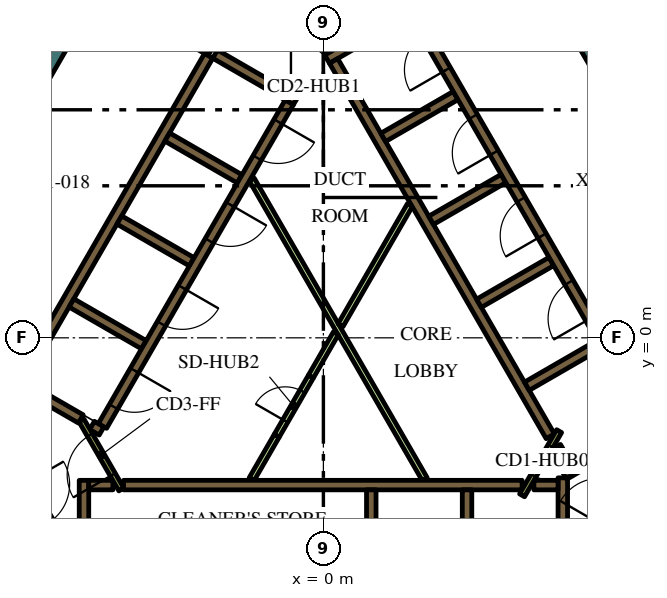
"""IFC4 building model, lengths in metres.
Left out: names, types, materials, properties, quantities, classifications, styles, units other than length and angle.
Written with IfcOpenShell. Run it as: python <this file> out.ifc"""

import sys

from ifc_helpers import new_model, si_unit, direction, frame, frame_2d, origin, place, context, subcontext, project, spatial, polyline, rectangle, outline, extrude, element, fill, save


model = new_model("IFC4")
c1 = context("Model", 3, precision=1e-05, world=origin(), true_north=direction((0.0, 1.0)))
c2 = subcontext(c1, "Body", "Model", "MODEL_VIEW")
j1 = project(units=[si_unit("LENGTHUNIT", "METRE"), si_unit("PLANEANGLEUNIT", "RADIAN")], contexts=[c1])
p1 = place(None, origin())
s1 = spatial("IfcSite", under=j1, at=p1, CompositionType="ELEMENT")
p2 = place(p1, origin())
s2 = spatial("IfcBuilding", under=s1, at=p2, CompositionType="ELEMENT")
p3 = place(p2, frame((0.0, 0.0, 271.2)))
s3 = spatial("IfcBuildingStorey", under=s2, at=p3, CompositionType="ELEMENT", Elevation=271.2)
p4 = place(p3, frame((1.989, 16.456, 0.0), z_axis=(0.0, 0.0, 1.0), x_axis=(0.49999102663, -0.8660305845, 0.0)))
e1 = element("IfcWall", 1, at=p4, inside=s3, PredefinedType="SOLIDWALL", context=c2, shape_type="SweptSolid", body=[
    extrude(rectangle(XDim=12.406, YDim=0.6, at=frame_2d((6.203, 0.0))), origin(), (0.0, 0.0, 1.0), 4.2),
])
p5 = place(p3, frame((-4.234, 12.566, 0.0), z_axis=(0.0, 0.0, 1.0), x_axis=(-0.499998841866, -0.866026072432, 0.0)))
e2 = element("IfcWall", 2, at=p5, inside=s3, PredefinedType="SOLIDWALL", context=c2, shape_type="SweptSolid", body=[
    extrude(rectangle(XDim=16.694, YDim=0.6, at=frame_2d((8.347, 0.0))), origin(), (0.0, 0.0, 1.0), 4.2),
])
p6 = place(p3, frame((6.3, -7.24, 0.0), z_axis=(0.0, 0.0, 1.0), x_axis=(0.0, 1.0, 0.0)))
e3 = element("IfcWall", 3, at=p6, inside=s3, PredefinedType="SOLIDWALL", context=c2, shape_type="SweptSolid", body=[
    extrude(rectangle(XDim=3.556, YDim=0.25, at=frame_2d((1.778, 0.0))), origin(), (0.0, 0.0, 1.0), 4.2),
])
p7 = place(p3, frame((5.538, -3.875, 0.0), z_axis=(0.0, 0.0, 1.0), x_axis=(1.0, 0.0, 0.0)))
e4 = element("IfcWall", 4, at=p7, inside=s3, PredefinedType="SOLIDWALL", context=c2, shape_type="SweptSolid", body=[
    extrude(rectangle(XDim=0.637, YDim=0.25, at=frame_2d((0.318, 0.0))), origin(), (0.0, 0.0, 1.0), 4.2),
])
p8 = place(p3, frame((-5.259, -3.875, 0.0), z_axis=(0.0, 0.0, 1.0), x_axis=(1.0, 0.0, 0.0)))
e5 = element("IfcWall", 5, at=p8, inside=s3, PredefinedType="SOLIDWALL", context=c2, shape_type="SweptSolid", body=[
    extrude(rectangle(XDim=10.489, YDim=0.25, at=frame_2d((5.244, 0.0))), origin(), (0.0, 0.0, 1.0), 4.2),
])
for number, where, z_axis, x_axis in (
    (6, (1.26, -4.0, 0.0), (0.0, 0.0, 1.0), (0.0, -1.0, 0.0)),
    (7, (3.78, -4.0, 0.0), (0.0, 0.0, 1.0), (0.0, -1.0, 0.0)),
):
    element("IfcWall", number, at=place(p3, frame(where, z_axis=z_axis, x_axis=x_axis)), inside=s3, PredefinedType="SOLIDWALL", context=c2, shape_type="SweptSolid", body=[
        extrude(rectangle(XDim=2.2, YDim=0.25, at=frame_2d((1.1, 0.0))), origin(), (0.0, 0.0, 1.0), 4.2),
    ])
p9 = place(p3, frame((-6.3, -7.125, 0.0), z_axis=(0.0, 0.0, 1.0), x_axis=(0.0, 1.0, 0.0)))
e8 = element("IfcWall", 8, at=p9, inside=s3, PredefinedType="SOLIDWALL", context=c2, shape_type="SweptSolid", body=[
    extrude(rectangle(XDim=3.375, YDim=0.25, at=frame_2d((1.687, 0.0))), origin(), (0.0, 0.0, 1.0), 4.2),
])
p10 = place(p3, frame((-6.175, -3.875, 0.0), z_axis=(0.0, 0.0, 1.0), x_axis=(1.0, 0.0, 0.0)))
e9 = element("IfcWall", 9, at=p10, inside=s3, PredefinedType="SOLIDWALL", context=c2, shape_type="SweptSolid", body=[
    extrude(rectangle(XDim=0.637, YDim=0.25, at=frame_2d((0.318, 0.0))), origin(), (0.0, 0.0, 1.0), 4.2),
])
p11 = place(p3, frame((9.19, -1.969, 0.0), z_axis=(0.0, 0.0, 1.0), x_axis=(-0.866057109641, -0.499945079824, 0.0)))
e10 = element("IfcWall", 10, at=p11, inside=s3, PredefinedType="SOLIDWALL", context=c2, shape_type="SweptSolid", body=[
    extrude(rectangle(XDim=3.291, YDim=0.25, at=frame_2d((1.646, 0.0))), origin(), (0.0, 0.0, 1.0), 4.2),
])
p12 = place(p3, frame((6.13, -2.867, 0.0), z_axis=(0.0, 0.0, 1.0), x_axis=(0.500160776593, -0.865932559475, 0.0)))
e11 = element("IfcWall", 11, at=p12, inside=s3, PredefinedType="SOLIDWALL", context=c2, shape_type="SweptSolid", body=[
    extrude(rectangle(XDim=0.627, YDim=0.25, at=frame_2d((0.313, 0.0))), origin(), (0.0, 0.0, 1.0), 4.2),
])
p13 = place(p3, frame((3.1, 9.064, 0.0), z_axis=(0.0, 0.0, 1.0), x_axis=(-0.866033137035, -0.499986605379, 0.0)))
e12 = element("IfcWall", 12, at=p13, inside=s3, PredefinedType="SOLIDWALL", context=c2, shape_type="SweptSolid", body=[
    extrude(rectangle(XDim=3.467, YDim=0.25, at=frame_2d((1.733, 0.0))), origin(), (0.0, 0.0, 1.0), 4.2),
])
p14 = place(p3, frame((0.268, 7.285, 0.0), z_axis=(0.0, 0.0, 1.0), x_axis=(0.500098681536, -0.865968422476, 0.0)))
e13 = element("IfcWall", 13, at=p14, inside=s3, PredefinedType="SOLIDWALL", context=c2, shape_type="SweptSolid", body=[
    extrude(rectangle(XDim=0.636, YDim=0.25, at=frame_2d((0.318, 0.0))), origin(), (0.0, 0.0, 1.0), 4.2),
])
p15 = place(p3, frame((5.97, -2.591, 0.0), z_axis=(0.0, 0.0, 1.0), x_axis=(-0.499994469932, 0.866028596547, 0.0)))
e14 = element("IfcWall", 14, at=p15, inside=s3, PredefinedType="SOLIDWALL", context=c2, shape_type="SweptSolid", body=[
    extrude(rectangle(XDim=10.488, YDim=0.25, at=frame_2d((5.244, 0.0))), origin(), (0.0, 0.0, 1.0), 4.2),
])
p16 = place(p3, frame((1.574, 5.274, 0.0), z_axis=(0.0, 0.0, 1.0), x_axis=(0.866028486751, 0.499994660107, 0.0)))
e15 = element("IfcWall", 15, at=p16, inside=s3, PredefinedType="SOLIDWALL", context=c2, shape_type="SweptSolid", body=[
    extrude(rectangle(XDim=2.2, YDim=0.25, at=frame_2d((1.1, 0.0))), origin(), (0.0, 0.0, 1.0), 4.2),
])
for number, where, z_axis, x_axis in (
    (16, (2.834, 3.091, 0.0), (0.0, 0.0, 1.0), (0.866, 0.5, 0.0)),
    (17, (4.094, 0.909, 0.0), (0.0, 0.0, 1.0), (0.866, 0.5, 0.0)),
    (18, (5.354, -1.274, 0.0), (0.0, 0.0, 1.0), (0.866, 0.5, 0.0)),
):
    element("IfcWall", number, at=place(p3, frame(where, z_axis=z_axis, x_axis=x_axis)), inside=s3, PredefinedType="SOLIDWALL", context=c2, shape_type="SweptSolid", body=[
        extrude(rectangle(XDim=2.2, YDim=0.25, at=frame_2d((1.1, 0.0))), origin(), (0.0, 0.0, 1.0), 4.2),
    ])
p17 = place(p3, frame((-3.02, 7.419, 0.0), z_axis=(0.0, 0.0, 1.0), x_axis=(-0.500022956343, -0.866012149528, 0.0)))
e19 = element("IfcWall", 19, at=p17, inside=s3, PredefinedType="SOLIDWALL", context=c2, shape_type="SweptSolid", body=[
    extrude(rectangle(XDim=10.08, YDim=0.25, at=frame_2d((5.04, 0.0))), origin(), (0.0, 0.0, 1.0), 4.2),
])
p18 = place(p3, origin())
e20 = element("IfcWall", 20, at=p18, inside=s3, PredefinedType="SOLIDWALL", context=c2, shape_type="SweptSolid", body=[
    extrude(outline(polyline([(-2.912, 7.356), (-2.787, 7.573), (-1.232, 6.675), (-1.303, 6.675), (-1.304, 6.675), (-1.304, 6.675), (-1.304, 6.525), (-1.304, 6.525), (-1.303, 6.525), (-0.971, 6.525), (-0.665, 6.348), (-0.79, 6.132), (-1.007, 6.257), (-1.007, 6.257), (-2.912, 7.356)])), origin(), (0.0, 0.0, 1.0), 4.2),
])
for number, where, z_axis, x_axis in (
    (21, (-2.204, 4.182, 0.0), (0.0, 0.0, 1.0), (-0.866, 0.5, 0.0)),
    (22, (-5.369, 3.1, 0.0), (0.0, 0.0, 1.0), (0.866, -0.5, 0.0)),
    (23, (-4.724, -0.182, 0.0), (0.0, 0.0, 1.0), (-0.866, 0.5, 0.0)),
):
    element("IfcWall", number, at=place(p3, frame(where, z_axis=z_axis, x_axis=x_axis)), inside=s3, PredefinedType="SOLIDWALL", context=c2, shape_type="SweptSolid", body=[
        extrude(rectangle(XDim=2.2, YDim=0.25, at=frame_2d((1.1, 0.0))), origin(), (0.0, 0.0, 1.0), 4.2),
    ])
p19 = place(p3, frame((-6.088, -2.305, 0.0), z_axis=(0.0, 0.0, 1.0), x_axis=(0.866059450854, -0.499941024108, 0.0)))
e24 = element("IfcWall", 24, at=p19, inside=s3, PredefinedType="SOLIDWALL", context=c2, shape_type="SweptSolid", body=[
    extrude(rectangle(XDim=0.29, YDim=0.25, at=frame_2d((0.145, 0.0))), origin(), (0.0, 0.0, 1.0), 4.2),
])
p20 = place(p3, frame((-7.889, -1.265, 0.0), z_axis=(0.0, 0.0, 1.0), x_axis=(0.865986741702, -0.500066958712, 0.0)))
e25 = element("IfcWall", 25, at=p20, inside=s3, PredefinedType="SOLIDWALL", context=c2, shape_type="SweptSolid", body=[
    extrude(rectangle(XDim=1.738, YDim=0.25, at=frame_2d((0.869, 0.0))), origin(), (0.0, 0.0, 1.0), 4.2),
])
p21 = place(p3, frame((-1.887, 4.168, 0.0), z_axis=(0.0, 0.0, 1.0), x_axis=(0.499997069472, -0.866027095719, 0.0)))
e26 = element("IfcWall", 26, at=p21, inside=s3, PredefinedType="PARTITIONING", context=c2, shape_type="SweptSolid", body=[
    extrude(rectangle(XDim=9.106, YDim=0.15, at=frame_2d((4.553, 0.0))), origin(), (0.0, 0.0, 1.0), 3.55),
])
p22 = place(p3, frame((-0.329, -1.021, 0.0), z_axis=(0.0, 0.0, 1.0), x_axis=(0.500033191285, 0.866006239939, 0.0)))
e27 = element("IfcWall", 27, at=p22, inside=s3, PredefinedType="PARTITIONING", context=c2, shape_type="SweptSolid", body=[
    extrude(rectangle(XDim=1.315, YDim=0.15, at=frame_2d((0.657, 0.0))), origin(), (0.0, 0.0, 1.0), 3.55),
])
p23 = place(p3, frame((2.277, 3.493, 0.0), z_axis=(0.0, 0.0, 1.0), x_axis=(-0.499994550825, -0.866028549844, 0.0)))
e28 = element("IfcWall", 28, at=p23, inside=s3, PredefinedType="PARTITIONING", context=c2, shape_type="SweptSolid", body=[
    extrude(rectangle(XDim=3.65, YDim=0.15, at=frame_2d((1.825, 0.0))), origin(), (0.0, 0.0, 1.0), 3.55),
])
p24 = place(p3, frame((-1.887, -3.718, 0.0), z_axis=(0.0, 0.0, 1.0), x_axis=(0.500033191285, 0.866006239939, 0.0)))
e29 = element("IfcWall", 29, at=p24, inside=s3, PredefinedType="PARTITIONING", context=c2, shape_type="SweptSolid", body=[
    extrude(rectangle(XDim=1.315, YDim=0.15, at=frame_2d((0.657, 0.0))), origin(), (0.0, 0.0, 1.0), 3.55),
])
p25 = place(p3, frame((8.565, -2.185, 0.0), z_axis=(0.0, 0.0, 1.0), x_axis=(-0.499997954832, 0.866026584559, 0.0)))
e30 = element("IfcWall", 30, at=p25, inside=s3, PredefinedType="SOLIDWALL", context=c2, shape_type="SweptSolid", body=[
    extrude(rectangle(XDim=12.35, YDim=0.25, at=frame_2d((6.175, 0.0))), origin(), (0.0, 0.0, 1.0), 4.2),
])
p26 = place(p25, frame((0.685, 0.0, 0.0)))
e31 = element("IfcOpeningElement", 31, at=p26, cuts=e30, PredefinedType="OPENING", context=c2, shape_type="SweptSolid", body=[
    extrude(rectangle(XDim=0.9, YDim=2.1, at=frame_2d((0.45, 1.05))), frame((0.0, 0.135, 0.0), z_axis=(0.0, -1.0, 0.0), x_axis=(1.0, 0.0, 0.0)), (0.0, 0.0, 1.0), 0.27),
])
p27 = place(p25, frame((3.105, 0.0, 0.0)))
e32 = element("IfcOpeningElement", 32, at=p27, cuts=e30, PredefinedType="OPENING", context=c2, shape_type="SweptSolid", body=[
    extrude(rectangle(XDim=1.1, YDim=2.1, at=frame_2d((0.55, 1.05))), frame((0.0, 0.135, 0.0), z_axis=(0.0, -1.0, 0.0), x_axis=(1.0, 0.0, 0.0)), (0.0, 0.0, 1.0), 0.27),
])
p28 = place(p25, frame((5.625, 0.0, 0.0)))
e33 = element("IfcOpeningElement", 33, at=p28, cuts=e30, PredefinedType="OPENING", context=c2, shape_type="SweptSolid", body=[
    extrude(rectangle(XDim=1.1, YDim=2.1, at=frame_2d((0.55, 1.05))), frame((0.0, 0.135, 0.0), z_axis=(0.0, -1.0, 0.0), x_axis=(1.0, 0.0, 0.0)), (0.0, 0.0, 1.0), 0.27),
])
p29 = place(p25, frame((8.145, 0.0, 0.0)))
e34 = element("IfcOpeningElement", 34, at=p29, cuts=e30, PredefinedType="OPENING", context=c2, shape_type="SweptSolid", body=[
    extrude(rectangle(XDim=1.1, YDim=2.1, at=frame_2d((0.55, 1.05))), frame((0.0, 0.135, 0.0), z_axis=(0.0, -1.0, 0.0), x_axis=(1.0, 0.0, 0.0)), (0.0, 0.0, 1.0), 0.27),
])
p30 = place(p25, frame((10.665, 0.0, 0.0)))
e35 = element("IfcOpeningElement", 35, at=p30, cuts=e30, PredefinedType="OPENING", context=c2, shape_type="SweptSolid", body=[
    extrude(rectangle(XDim=1.1, YDim=2.1, at=frame_2d((0.55, 1.05))), frame((0.0, 0.135, 0.0), z_axis=(0.0, -1.0, 0.0), x_axis=(1.0, 0.0, 0.0)), (0.0, 0.0, 1.0), 0.27),
])
p31 = place(p3, frame((-0.898, 6.194, 0.0), z_axis=(0.0, 0.0, 1.0), x_axis=(-0.499996202215, -0.866027596426, 0.0)))
e36 = element("IfcWall", 36, at=p31, inside=s3, PredefinedType="SOLIDWALL", context=c2, shape_type="SweptSolid", body=[
    extrude(rectangle(XDim=9.83, YDim=0.25, at=frame_2d((4.915, 0.0))), origin(), (0.0, 0.0, 1.0), 4.2),
])
p32 = place(p31, frame((0.585, 0.0, 0.0)))
e37 = element("IfcOpeningElement", 37, at=p32, cuts=e36, PredefinedType="OPENING", context=c2, shape_type="SweptSolid", body=[
    extrude(rectangle(XDim=1.1, YDim=2.1, at=frame_2d((0.55, 1.05))), frame((0.0, 0.135, 0.0), z_axis=(0.0, -1.0, 0.0), x_axis=(1.0, 0.0, 0.0)), (0.0, 0.0, 1.0), 0.27),
])
p33 = place(p31, frame((3.105, 0.0, 0.0)))
e38 = element("IfcOpeningElement", 38, at=p33, cuts=e36, PredefinedType="OPENING", context=c2, shape_type="SweptSolid", body=[
    extrude(rectangle(XDim=1.1, YDim=2.1, at=frame_2d((0.55, 1.05))), frame((0.0, 0.135, 0.0), z_axis=(0.0, -1.0, 0.0), x_axis=(1.0, 0.0, 0.0)), (0.0, 0.0, 1.0), 0.27),
])
p34 = place(p31, frame((5.625, 0.0, 0.0)))
e39 = element("IfcOpeningElement", 39, at=p34, cuts=e36, PredefinedType="OPENING", context=c2, shape_type="SweptSolid", body=[
    extrude(rectangle(XDim=1.1, YDim=2.1, at=frame_2d((0.55, 1.05))), frame((0.0, 0.135, 0.0), z_axis=(0.0, -1.0, 0.0), x_axis=(1.0, 0.0, 0.0)), (0.0, 0.0, 1.0), 0.27),
])
p35 = place(p31, frame((8.145, 0.0, 0.0)))
e40 = element("IfcOpeningElement", 40, at=p35, cuts=e36, PredefinedType="OPENING", context=c2, shape_type="SweptSolid", body=[
    extrude(rectangle(XDim=1.1, YDim=2.1, at=frame_2d((0.55, 1.05))), frame((0.0, 0.135, 0.0), z_axis=(0.0, -1.0, 0.0), x_axis=(1.0, 0.0, 0.0)), (0.0, 0.0, 1.0), 0.27),
])
p36 = place(p3, frame((7.053, -5.284, 0.0), z_axis=(0.0, 0.0, 1.0), x_axis=(0.500078061341, 0.865980330357, 0.0)))
e41 = element("IfcWall", 41, at=p36, inside=s3, PredefinedType="SOLIDWALL", context=c2, shape_type="SweptSolid", body=[
    extrude(rectangle(XDim=2.1, YDim=0.4, at=frame_2d((1.05, 0.0))), origin(), (0.0, 0.0, 1.0), 4.2),
])
p37 = place(p36, frame((0.45, 0.0, 0.0)))
e42 = element("IfcOpeningElement", 42, at=p37, cuts=e41, PredefinedType="OPENING", context=c2, shape_type="SweptSolid", body=[
    extrude(rectangle(XDim=1.2, YDim=2.1, at=frame_2d((0.6, 1.05))), frame((0.0, 0.21, 0.0), z_axis=(0.0, -1.0, 0.0), x_axis=(1.0, 0.0, 0.0)), (0.0, 0.0, 1.0), 0.42),
])
p38 = place(p3, frame((-8.103, -3.466, 0.0), z_axis=(0.0, 0.0, 1.0), x_axis=(0.500078061341, -0.865980330357, 0.0)))
e43 = element("IfcWall", 43, at=p38, inside=s3, PredefinedType="SOLIDWALL", context=c2, shape_type="SweptSolid", body=[
    extrude(rectangle(XDim=2.1, YDim=0.4, at=frame_2d((1.05, 0.0))), origin(), (0.0, 0.0, 1.0), 4.2),
])
p39 = place(p38, frame((0.45, 0.0, 0.0)))
e44 = element("IfcOpeningElement", 44, at=p39, cuts=e43, PredefinedType="OPENING", context=c2, shape_type="SweptSolid", body=[
    extrude(rectangle(XDim=1.2, YDim=2.1, at=frame_2d((0.6, 1.05))), frame((0.0, 0.21, 0.0), z_axis=(0.0, -1.0, 0.0), x_axis=(1.0, 0.0, 0.0)), (0.0, 0.0, 1.0), 0.42),
])
p40 = place(p3, frame((6.203, -2.456, 0.0), z_axis=(0.0, 0.0, 1.0), x_axis=(-0.500043961785, -0.866000020948, 0.0)))
e45 = element("IfcWall", 45, at=p40, inside=s3, PredefinedType="PARTITIONING", context=c2, shape_type="SweptSolid", body=[
    extrude(rectangle(XDim=1.95, YDim=0.15, at=frame_2d((0.975, 0.0))), origin(), (0.0, 0.0, 1.0), 4.2),
])
p41 = place(p40, frame((0.45, 0.0, 0.0)))
e46 = element("IfcOpeningElement", 46, at=p41, cuts=e45, PredefinedType="OPENING", context=c2, shape_type="SweptSolid", body=[
    extrude(rectangle(XDim=0.9, YDim=2.1, at=frame_2d((0.45, 1.05))), frame((0.0, 0.085, 0.0), z_axis=(0.0, -1.0, 0.0), x_axis=(1.0, 0.0, 0.0)), (0.0, 0.0, 1.0), 0.17),
])
p42 = place(p3, frame((-1.303, 6.6, 0.0), z_axis=(0.0, 0.0, 1.0), x_axis=(1.0, 0.0, 0.0)))
e47 = element("IfcWall", 47, at=p42, inside=s3, PredefinedType="PARTITIONING", context=c2, shape_type="SweptSolid", body=[
    extrude(rectangle(XDim=2.1, YDim=0.15, at=frame_2d((1.05, 0.0))), origin(), (0.0, 0.0, 1.0), 4.2),
])
p43 = place(p42, frame((0.45, 0.0, 0.0)))
e48 = element("IfcOpeningElement", 48, at=p43, cuts=e47, PredefinedType="OPENING", context=c2, shape_type="SweptSolid", body=[
    extrude(rectangle(XDim=1.2, YDim=2.1, at=frame_2d((0.6, 1.05))), frame((0.0, 0.085, 0.0), z_axis=(0.0, -1.0, 0.0), x_axis=(1.0, 0.0, 0.0)), (0.0, 0.0, 1.0), 0.17),
])
p44 = place(p3, frame((-5.317, -3.99, 0.0), z_axis=(0.0, 0.0, 1.0), x_axis=(-0.500027713859, 0.866009402589, 0.0)))
e49 = element("IfcWall", 49, at=p44, inside=s3, PredefinedType="PARTITIONING", context=c2, shape_type="SweptSolid", body=[
    extrude(rectangle(XDim=2.1, YDim=0.15, at=frame_2d((1.05, 0.0))), origin(), (0.0, 0.0, 1.0), 4.2),
])
p45 = place(p44, frame((0.45, 0.0, 0.0)))
e50 = element("IfcOpeningElement", 50, at=p45, cuts=e49, PredefinedType="OPENING", context=c2, shape_type="SweptSolid", body=[
    extrude(rectangle(XDim=1.2, YDim=2.1, at=frame_2d((0.6, 1.05))), frame((0.0, 0.085, 0.0), z_axis=(0.0, -1.0, 0.0), x_axis=(1.0, 0.0, 0.0)), (0.0, 0.0, 1.0), 0.17),
])
p46 = place(p3, frame((-4.796, 8.575, 0.0), z_axis=(0.0, 0.0, 1.0), x_axis=(0.866009402589, -0.500027713859, 0.0)))
e51 = element("IfcWall", 51, at=p46, inside=s3, PredefinedType="PARTITIONING", context=c2, shape_type="SweptSolid", body=[
    extrude(rectangle(XDim=2.1, YDim=0.226, at=frame_2d((1.05, 0.0))), origin(), (0.0, 0.0, 1.0), 3.55),
])
p47 = place(p46, frame((0.45, 0.0, 0.0)))
e52 = element("IfcOpeningElement", 52, at=p47, cuts=e51, PredefinedType="OPENING", context=c2, shape_type="SweptSolid", body=[
    extrude(rectangle(XDim=1.2, YDim=2.1, at=frame_2d((0.6, 1.05))), frame((0.0, 0.123, 0.0), z_axis=(0.0, -1.0, 0.0), x_axis=(1.0, 0.0, 0.0)), (0.0, 0.0, 1.0), 0.246),
])
p48 = place(p3, frame((-1.229, -2.579, 0.0), z_axis=(0.0, 0.0, 1.0), x_axis=(0.500062916607, 0.865989075817, 0.0)))
e53 = element("IfcWall", 53, at=p48, inside=s3, PredefinedType="PARTITIONING", context=c2, shape_type="SweptSolid", body=[
    extrude(rectangle(XDim=1.8, YDim=0.15, at=frame_2d((0.9, 0.0))), origin(), (0.0, 0.0, 1.0), 3.55),
])
p49 = place(p48, frame((0.45, 0.0, 0.0)))
e54 = element("IfcOpeningElement", 54, at=p49, cuts=e53, PredefinedType="OPENING", context=c2, shape_type="SweptSolid", body=[
    extrude(rectangle(XDim=0.9, YDim=2.1, at=frame_2d((0.45, 1.05))), frame((0.0, 0.085, 0.0), z_axis=(0.0, -1.0, 0.0), x_axis=(1.0, 0.0, 0.0)), (0.0, 0.0, 1.0), 0.17),
])
p50 = place(p27, origin())
e55 = element("IfcDoor", 55, at=p50, inside=s3, OperationType="DOUBLE_DOOR_SLIDING", PredefinedType="DOOR", context=c2, shape_type="SweptSolid", body=[
    extrude(rectangle(XDim=1.1, YDim=2.1, at=frame_2d((0.55, 1.05))), frame((0.0, 0.025, 0.0), z_axis=(0.0, -1.0, 0.0), x_axis=(1.0, 0.0, 0.0)), (0.0, 0.0, 1.0), 0.05),
])
fill(e32, e55)
p51 = place(p28, origin())
e56 = element("IfcDoor", 56, at=p51, inside=s3, OperationType="DOUBLE_DOOR_SLIDING", PredefinedType="DOOR", context=c2, shape_type="SweptSolid", body=[
    extrude(rectangle(XDim=1.1, YDim=2.1, at=frame_2d((0.55, 1.05))), frame((0.0, 0.025, 0.0), z_axis=(0.0, -1.0, 0.0), x_axis=(1.0, 0.0, 0.0)), (0.0, 0.0, 1.0), 0.05),
])
fill(e33, e56)
p52 = place(p29, origin())
e57 = element("IfcDoor", 57, at=p52, inside=s3, OperationType="DOUBLE_DOOR_SLIDING", PredefinedType="DOOR", context=c2, shape_type="SweptSolid", body=[
    extrude(rectangle(XDim=1.1, YDim=2.1, at=frame_2d((0.55, 1.05))), frame((0.0, 0.025, 0.0), z_axis=(0.0, -1.0, 0.0), x_axis=(1.0, 0.0, 0.0)), (0.0, 0.0, 1.0), 0.05),
])
fill(e34, e57)
p53 = place(p30, origin())
e58 = element("IfcDoor", 58, at=p53, inside=s3, OperationType="DOUBLE_DOOR_SLIDING", PredefinedType="DOOR", context=c2, shape_type="SweptSolid", body=[
    extrude(rectangle(XDim=1.1, YDim=2.1, at=frame_2d((0.55, 1.05))), frame((0.0, 0.025, 0.0), z_axis=(0.0, -1.0, 0.0), x_axis=(1.0, 0.0, 0.0)), (0.0, 0.0, 1.0), 0.05),
])
fill(e35, e58)
p54 = place(p32, origin())
e59 = element("IfcDoor", 59, at=p54, inside=s3, OperationType="DOUBLE_DOOR_SLIDING", PredefinedType="DOOR", context=c2, shape_type="SweptSolid", body=[
    extrude(rectangle(XDim=1.1, YDim=2.1, at=frame_2d((0.55, 1.05))), frame((0.0, 0.025, 0.0), z_axis=(0.0, -1.0, 0.0), x_axis=(1.0, 0.0, 0.0)), (0.0, 0.0, 1.0), 0.05),
])
fill(e37, e59)
p55 = place(p33, origin())
e60 = element("IfcDoor", 60, at=p55, inside=s3, OperationType="DOUBLE_DOOR_SLIDING", PredefinedType="DOOR", context=c2, shape_type="SweptSolid", body=[
    extrude(rectangle(XDim=1.1, YDim=2.1, at=frame_2d((0.55, 1.05))), frame((0.0, 0.025, 0.0), z_axis=(0.0, -1.0, 0.0), x_axis=(1.0, 0.0, 0.0)), (0.0, 0.0, 1.0), 0.05),
])
fill(e38, e60)
p56 = place(p34, origin())
e61 = element("IfcDoor", 61, at=p56, inside=s3, OperationType="DOUBLE_DOOR_SLIDING", PredefinedType="DOOR", context=c2, shape_type="SweptSolid", body=[
    extrude(rectangle(XDim=1.1, YDim=2.1, at=frame_2d((0.55, 1.05))), frame((0.0, 0.025, 0.0), z_axis=(0.0, -1.0, 0.0), x_axis=(1.0, 0.0, 0.0)), (0.0, 0.0, 1.0), 0.05),
])
fill(e39, e61)
p57 = place(p35, origin())
e62 = element("IfcDoor", 62, at=p57, inside=s3, OperationType="DOUBLE_DOOR_SLIDING", PredefinedType="DOOR", context=c2, shape_type="SweptSolid", body=[
    extrude(rectangle(XDim=1.1, YDim=2.1, at=frame_2d((0.55, 1.05))), frame((0.0, 0.025, 0.0), z_axis=(0.0, -1.0, 0.0), x_axis=(1.0, 0.0, 0.0)), (0.0, 0.0, 1.0), 0.05),
])
fill(e40, e62)
p58 = place(p41, origin())
e63 = element("IfcDoor", 63, at=p58, inside=s3, OperationType="SINGLE_SWING_LEFT", PredefinedType="DOOR", context=c2, shape_type="SweptSolid", body=[
    extrude(rectangle(XDim=0.9, YDim=2.1, at=frame_2d((0.45, 1.05))), frame((0.0, 0.025, 0.0), z_axis=(0.0, -1.0, 0.0), x_axis=(1.0, 0.0, 0.0)), (0.0, 0.0, 1.0), 0.05),
])
fill(e46, e63)
p59 = place(p43, origin())
e64 = element("IfcDoor", 64, at=p59, inside=s3, OperationType="SINGLE_SWING_LEFT", PredefinedType="DOOR", context=c2, shape_type="SweptSolid", body=[
    extrude(rectangle(XDim=1.2, YDim=2.1, at=frame_2d((0.6, 1.05))), frame((0.0, 0.025, 0.0), z_axis=(0.0, -1.0, 0.0), x_axis=(1.0, 0.0, 0.0)), (0.0, 0.0, 1.0), 0.05),
])
fill(e48, e64)
p60 = place(p45, origin())
e65 = element("IfcDoor", 65, at=p60, inside=s3, OperationType="SINGLE_SWING_LEFT", PredefinedType="DOOR", context=c2, shape_type="SweptSolid", body=[
    extrude(rectangle(XDim=1.2, YDim=2.1, at=frame_2d((0.6, 1.05))), frame((0.0, 0.025, 0.0), z_axis=(0.0, -1.0, 0.0), x_axis=(1.0, 0.0, 0.0)), (0.0, 0.0, 1.0), 0.05),
])
fill(e50, e65)
p61 = place(p49, origin())
e66 = element("IfcDoor", 66, at=p61, inside=s3, OperationType="SINGLE_SWING_LEFT", PredefinedType="DOOR", context=c2, shape_type="SweptSolid", body=[
    extrude(rectangle(XDim=0.9, YDim=2.1, at=frame_2d((0.45, 1.05))), frame((0.0, 0.025, 0.0), z_axis=(0.0, -1.0, 0.0), x_axis=(1.0, 0.0, 0.0)), (0.0, 0.0, 1.0), 0.05),
])
fill(e54, e66)
save(model, sys.argv[1])
